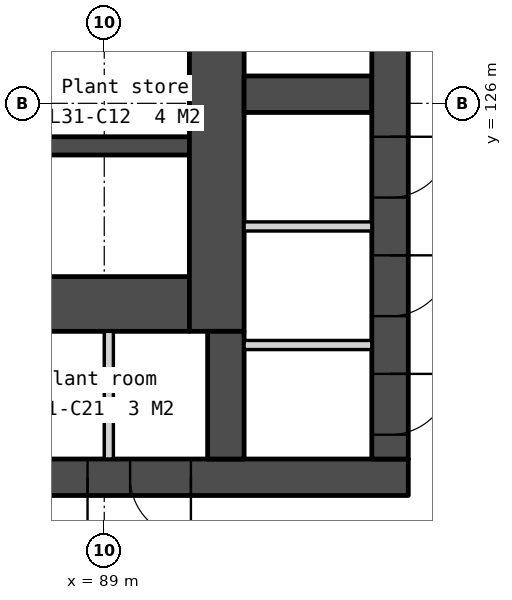
"""IFC4 building model, lengths in metres.
Left out: names, types, materials, properties, quantities, classifications, styles, units other than length and angle.
Written with IfcOpenShell. Run it as: python <this file> out.ifc"""

import sys

from ifc_helpers import new_model, si_unit, direction, frame, frame_2d, origin, place, context, subcontext, project, spatial, rectangle, extrude, element, fill, save


model = new_model("IFC4")
c1 = context("Model", 3, precision=1e-05, world=origin(), true_north=direction((0.0, 1.0)))
c2 = subcontext(c1, "Body", "Model", "MODEL_VIEW")
j1 = project(units=[si_unit("LENGTHUNIT", "METRE"), si_unit("PLANEANGLEUNIT", "RADIAN")], contexts=[c1])
p1 = place(None, origin())
s1 = spatial("IfcSite", under=j1, at=p1, CompositionType="ELEMENT")
p2 = place(p1, origin())
s2 = spatial("IfcBuilding", under=s1, at=p2, CompositionType="ELEMENT")
p3 = place(p2, frame((0.0, 0.0, 123.8)))
s3 = spatial("IfcBuildingStorey", under=s2, at=p3, CompositionType="ELEMENT", Elevation=123.8)
p4 = place(p3, frame((66.0, 119.85, 0.0), z_axis=(0.0, 0.0, 1.0), x_axis=(1.0, 0.0, 0.0)))
e1 = element("IfcWall", 1, at=p4, inside=s3, PredefinedType="SOLIDWALL", context=c2, shape_type="SweptSolid", body=[
    extrude(rectangle(XDim=28.0, YDim=0.6, at=frame_2d((14.0, 0.0))), origin(), (0.0, 0.0, 1.0), 4.35),
])
p5 = place(p4, frame((6.825, 0.0, 0.0)))
e2 = element("IfcOpeningElement", 2, at=p5, cuts=e1, PredefinedType="OPENING", context=c2, shape_type="SweptSolid", body=[
    extrude(rectangle(XDim=1.8, YDim=2.1, at=frame_2d((0.9, 1.05))), frame((0.0, 0.31, 0.0), z_axis=(0.0, -1.0, 0.0), x_axis=(1.0, 0.0, 0.0)), (0.0, 0.0, 1.0), 0.62),
])
p6 = place(p4, frame((15.85, 0.0, 0.0)))
e3 = element("IfcOpeningElement", 3, at=p6, cuts=e1, PredefinedType="OPENING", context=c2, shape_type="SweptSolid", body=[
    extrude(rectangle(XDim=1.5, YDim=2.1, at=frame_2d((0.75, 1.05))), frame((0.0, 0.31, 0.0), z_axis=(0.0, -1.0, 0.0), x_axis=(1.0, 0.0, 0.0)), (0.0, 0.0, 1.0), 0.62),
])
p7 = place(p4, frame((19.375, 0.0, 0.0)))
e4 = element("IfcOpeningElement", 4, at=p7, cuts=e1, PredefinedType="OPENING", context=c2, shape_type="SweptSolid", body=[
    extrude(rectangle(XDim=1.8, YDim=2.1, at=frame_2d((0.9, 1.05))), frame((0.0, 0.31, 0.0), z_axis=(0.0, -1.0, 0.0), x_axis=(1.0, 0.0, 0.0)), (0.0, 0.0, 1.0), 0.62),
])
p8 = place(p4, frame((4.425, 0.0, 0.0)))
e5 = element("IfcOpeningElement", 5, at=p8, cuts=e1, PredefinedType="OPENING", context=c2, shape_type="SweptSolid", body=[
    extrude(rectangle(XDim=1.0, YDim=2.1, at=frame_2d((0.5, 1.05))), frame((0.0, 0.31, 0.0), z_axis=(0.0, -1.0, 0.0), x_axis=(1.0, 0.0, 0.0)), (0.0, 0.0, 1.0), 0.62),
])
p9 = place(p4, frame((9.925, 0.0, 0.0)))
e6 = element("IfcOpeningElement", 6, at=p9, cuts=e1, PredefinedType="OPENING", context=c2, shape_type="SweptSolid", body=[
    extrude(rectangle(XDim=1.0, YDim=2.1, at=frame_2d((0.5, 1.05))), frame((0.0, 0.31, 0.0), z_axis=(0.0, -1.0, 0.0), x_axis=(1.0, 0.0, 0.0)), (0.0, 0.0, 1.0), 0.62),
])
p10 = place(p4, frame((13.125, 0.0, 0.0)))
e7 = element("IfcOpeningElement", 7, at=p10, cuts=e1, PredefinedType="OPENING", context=c2, shape_type="SweptSolid", body=[
    extrude(rectangle(XDim=1.0, YDim=2.1, at=frame_2d((0.5, 1.05))), frame((0.0, 0.31, 0.0), z_axis=(0.0, -1.0, 0.0), x_axis=(1.0, 0.0, 0.0)), (0.0, 0.0, 1.0), 0.62),
])
p11 = place(p4, frame((21.725, 0.0, 0.0)))
e8 = element("IfcOpeningElement", 8, at=p11, cuts=e1, PredefinedType="OPENING", context=c2, shape_type="SweptSolid", body=[
    extrude(rectangle(XDim=1.0, YDim=2.1, at=frame_2d((0.5, 1.05))), frame((0.0, 0.31, 0.0), z_axis=(0.0, -1.0, 0.0), x_axis=(1.0, 0.0, 0.0)), (0.0, 0.0, 1.0), 0.62),
])
p12 = place(p4, frame((23.425, 0.0, 0.0)))
e9 = element("IfcOpeningElement", 9, at=p12, cuts=e1, PredefinedType="OPENING", context=c2, shape_type="SweptSolid", body=[
    extrude(rectangle(XDim=1.0, YDim=2.1, at=frame_2d((0.5, 1.05))), frame((0.0, 0.31, 0.0), z_axis=(0.0, -1.0, 0.0), x_axis=(1.0, 0.0, 0.0)), (0.0, 0.0, 1.0), 0.62),
])
p13 = place(p3, frame((87.85, 125.3, 0.0), z_axis=(0.0, 0.0, 1.0), x_axis=(1.0, 0.0, 0.0)))
e10 = element("IfcWall", 10, at=p13, inside=s3, PredefinedType="SOLIDWALL", context=c2, shape_type="SweptSolid", body=[
    extrude(rectangle(XDim=2.55, YDim=0.3, at=frame_2d((1.275, 0.0))), origin(), (0.0, 0.0, 1.0), 4.35),
])
p14 = place(p3, frame((87.85, 122.7, 0.0), z_axis=(0.0, 0.0, 1.0), x_axis=(1.0, 0.0, 0.0)))
e11 = element("IfcWall", 11, at=p14, inside=s3, PredefinedType="SOLIDWALL", context=c2, shape_type="SweptSolid", body=[
    extrude(rectangle(XDim=2.55, YDim=0.9, at=frame_2d((1.275, 0.0))), origin(), (0.0, 0.0, 1.0), 4.35),
])
p15 = place(p3, frame((89.075, 122.25, 0.0), z_axis=(0.0, 0.0, 1.0), x_axis=(0.0, -1.0, 0.0)))
e12 = element("IfcWall", 12, at=p15, inside=s3, PredefinedType="PARTITIONING", context=c2, shape_type="SweptSolid", body=[
    extrude(rectangle(XDim=2.1, YDim=0.15, at=frame_2d((1.05, 0.0))), origin(), (0.0, 0.0, 1.0), 3.672),
])
p16 = place(p3, frame((90.85, 133.95, 0.0), z_axis=(0.0, 0.0, 1.0), x_axis=(0.0, -1.0, 0.0)))
e13 = element("IfcWall", 13, at=p16, inside=s3, PredefinedType="SOLIDWALL", context=c2, shape_type="SweptSolid", body=[
    extrude(rectangle(XDim=11.7, YDim=0.9, at=frame_2d((5.85, 0.0))), origin(), (0.0, 0.0, 1.0), 4.35),
])
p17 = place(p3, frame((91.0, 122.25, 0.0), z_axis=(0.0, 0.0, 1.0), x_axis=(0.0, -1.0, 0.0)))
e14 = element("IfcWall", 14, at=p17, inside=s3, PredefinedType="SOLIDWALL", context=c2, shape_type="SweptSolid", body=[
    extrude(rectangle(XDim=2.1, YDim=0.6, at=frame_2d((1.05, 0.0))), origin(), (0.0, 0.0, 1.0), 4.35),
])
p18 = place(p3, frame((91.3, 126.15, 0.0), z_axis=(0.0, 0.0, 1.0), x_axis=(1.0, 0.0, 0.0)))
e15 = element("IfcWall", 15, at=p18, inside=s3, PredefinedType="SOLIDWALL", context=c2, shape_type="SweptSolid", body=[
    extrude(rectangle(XDim=2.1, YDim=0.6, at=frame_2d((1.05, 0.0))), origin(), (0.0, 0.0, 1.0), 4.35),
])
for number, where, z_axis, x_axis in (
    (16, (91.3, 123.975, 0.0), (0.0, 0.0, 1.0), (1.0, 0.0, 0.0)),
    (17, (91.3, 122.025, 0.0), (0.0, 0.0, 1.0), (1.0, 0.0, 0.0)),
):
    element("IfcWall", number, at=place(p3, frame(where, z_axis=z_axis, x_axis=x_axis)), inside=s3, PredefinedType="PARTITIONING", context=c2, shape_type="SweptSolid", body=[
        extrude(rectangle(XDim=2.1, YDim=0.15, at=frame_2d((1.05, 0.0))), origin(), (0.0, 0.0, 1.0), 4.35),
    ])
p19 = place(p3, frame((93.7, 133.95, 0.0), z_axis=(0.0, 0.0, 1.0), x_axis=(0.0, -1.0, 0.0)))
e18 = element("IfcWall", 18, at=p19, inside=s3, PredefinedType="SOLIDWALL", context=c2, shape_type="SweptSolid", body=[
    extrude(rectangle(XDim=13.8, YDim=0.6, at=frame_2d((6.9, 0.0))), origin(), (0.0, 0.0, 1.0), 4.35),
])
p20 = place(p19, frame((12.4, 0.0, 0.0)))
e19 = element("IfcOpeningElement", 19, at=p20, cuts=e18, PredefinedType="OPENING", context=c2, shape_type="SweptSolid", body=[
    extrude(rectangle(XDim=1.0, YDim=2.1, at=frame_2d((0.5, 1.05))), frame((0.0, 0.31, 0.0), z_axis=(0.0, -1.0, 0.0), x_axis=(1.0, 0.0, 0.0)), (0.0, 0.0, 1.0), 0.62),
])
p21 = place(p19, frame((8.5, 0.0, 0.0)))
e20 = element("IfcOpeningElement", 20, at=p21, cuts=e18, PredefinedType="OPENING", context=c2, shape_type="SweptSolid", body=[
    extrude(rectangle(XDim=1.0, YDim=2.1, at=frame_2d((0.5, 1.05))), frame((0.0, 0.31, 0.0), z_axis=(0.0, -1.0, 0.0), x_axis=(1.0, 0.0, 0.0)), (0.0, 0.0, 1.0), 0.62),
])
p22 = place(p19, frame((10.45, 0.0, 0.0)))
e21 = element("IfcOpeningElement", 21, at=p22, cuts=e18, PredefinedType="OPENING", context=c2, shape_type="SweptSolid", body=[
    extrude(rectangle(XDim=1.0, YDim=2.1, at=frame_2d((0.5, 1.05))), frame((0.0, 0.31, 0.0), z_axis=(0.0, -1.0, 0.0), x_axis=(1.0, 0.0, 0.0)), (0.0, 0.0, 1.0), 0.62),
])
p23 = place(p20, origin())
e22 = element("IfcDoor", 22, at=p23, inside=s3, OperationType="SINGLE_SWING_LEFT", PredefinedType="DOOR", context=c2, shape_type="SweptSolid", body=[
    extrude(rectangle(XDim=1.0, YDim=2.1, at=frame_2d((0.5, 1.05))), frame((0.0, 0.025, 0.0), z_axis=(0.0, -1.0, 0.0), x_axis=(1.0, 0.0, 0.0)), (0.0, 0.0, 1.0), 0.05),
])
fill(e19, e22)
p24 = place(p21, origin())
e23 = element("IfcDoor", 23, at=p24, inside=s3, OperationType="SINGLE_SWING_LEFT", PredefinedType="DOOR", context=c2, shape_type="SweptSolid", body=[
    extrude(rectangle(XDim=1.0, YDim=2.1, at=frame_2d((0.5, 1.05))), frame((0.0, 0.025, 0.0), z_axis=(0.0, -1.0, 0.0), x_axis=(1.0, 0.0, 0.0)), (0.0, 0.0, 1.0), 0.05),
])
fill(e20, e23)
p25 = place(p22, origin())
e24 = element("IfcDoor", 24, at=p25, inside=s3, OperationType="SINGLE_SWING_LEFT", PredefinedType="DOOR", context=c2, shape_type="SweptSolid", body=[
    extrude(rectangle(XDim=1.0, YDim=2.1, at=frame_2d((0.5, 1.05))), frame((0.0, 0.025, 0.0), z_axis=(0.0, -1.0, 0.0), x_axis=(1.0, 0.0, 0.0)), (0.0, 0.0, 1.0), 0.05),
])
fill(e21, e24)
p26 = place(p11, origin())
e25 = element("IfcDoor", 25, at=p26, inside=s3, OperationType="SINGLE_SWING_RIGHT", PredefinedType="DOOR", context=c2, shape_type="SweptSolid", body=[
    extrude(rectangle(XDim=1.0, YDim=2.1, at=frame_2d((0.5, 1.05))), frame((0.0, 0.025, 0.0), z_axis=(0.0, -1.0, 0.0), x_axis=(1.0, 0.0, 0.0)), (0.0, 0.0, 1.0), 0.05),
])
fill(e8, e25)
p27 = place(p12, origin())
e26 = element("IfcDoor", 26, at=p27, inside=s3, OperationType="SINGLE_SWING_RIGHT", PredefinedType="DOOR", context=c2, shape_type="SweptSolid", body=[
    extrude(rectangle(XDim=1.0, YDim=2.1, at=frame_2d((0.5, 1.05))), frame((0.0, 0.025, 0.0), z_axis=(0.0, -1.0, 0.0), x_axis=(1.0, 0.0, 0.0)), (0.0, 0.0, 1.0), 0.05),
])
fill(e9, e26)
save(model, sys.argv[1])
